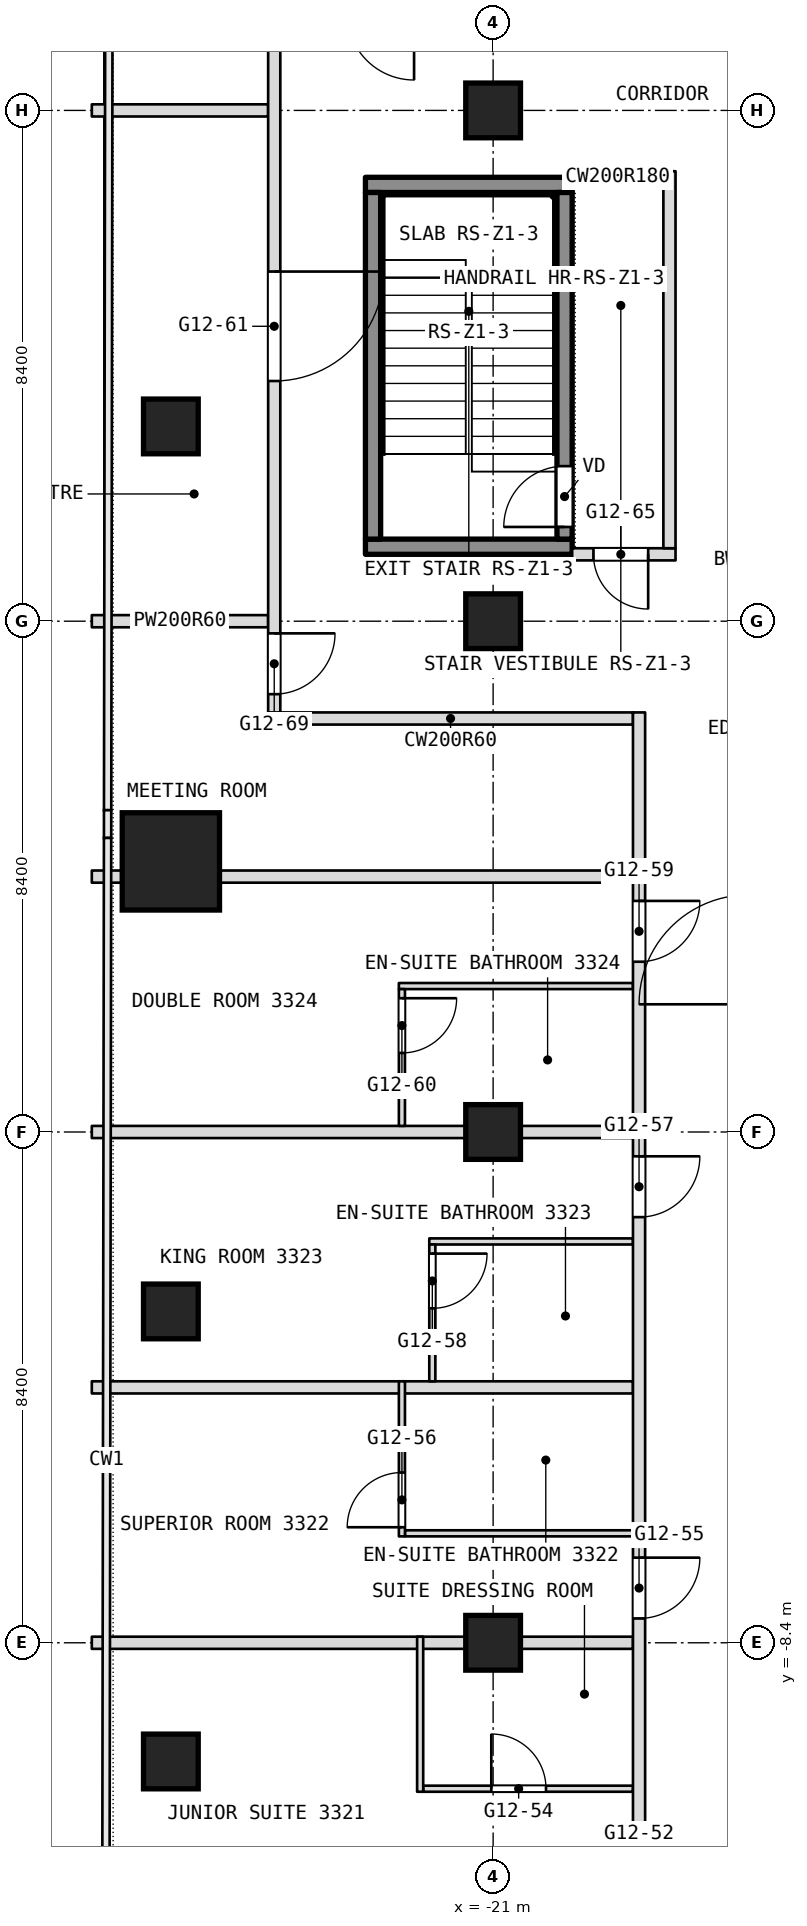
"""IFC4 building model, lengths in metres.
Left out: names, types, materials, properties, quantities, classifications, styles, units other than length and angle.
Written with IfcOpenShell. Run it as: python <this file> out.ifc"""

import sys

from ifc_helpers import new_model, si_unit, direction, frame, frame_2d, origin, origin_2d, place, context, subcontext, project, spatial, rectangle, extrude, element, fill, save


model = new_model("IFC4")
c1 = context("Model", 3, precision=1e-05, world=origin(), true_north=direction((0.0, 1.0)))
c2 = subcontext(c1, "Body", "Model", "MODEL_VIEW")
j1 = project(units=[si_unit("LENGTHUNIT", "METRE"), si_unit("PLANEANGLEUNIT", "RADIAN")], contexts=[c1])
p1 = place(None, origin())
s1 = spatial("IfcSite", under=j1, at=p1, CompositionType="ELEMENT")
p2 = place(p1, origin())
s2 = spatial("IfcBuilding", under=s1, at=p2, CompositionType="ELEMENT")
p3 = place(p2, frame((0.0, 0.0, 144.5)))
s3 = spatial("IfcBuildingStorey", under=s2, at=p3, CompositionType="ELEMENT", Elevation=144.5)
p4 = place(p3, frame((-26.3, 4.45, 0.0), z_axis=(0.0, 0.0, 1.0), x_axis=(1.0, 0.0, 0.0)))
e1 = element("IfcColumn", 1, at=p4, inside=s3, PredefinedType="COLUMN", context=c2, shape_type="SweptSolid", body=[
    extrude(rectangle(XDim=1.6, YDim=1.6, at=origin_2d()), origin(), (0.0, 0.0, 1.0), 3.6),
])
for number, where, z_axis, x_axis in (
    (2, (-21.0, -8.4, 0.0), (0.0, 0.0, 1.0), (1.0, 0.0, 0.0)),
    (3, (-21.0, 0.0, 0.0), (0.0, 0.0, 1.0), (1.0, 0.0, 0.0)),
    (4, (-21.0, 8.4, 0.0), (0.0, 0.0, 1.0), (1.0, 0.0, 0.0)),
    (5, (-21.0, 16.8, 0.0), (0.0, 0.0, 1.0), (1.0, 0.0, 0.0)),
    (6, (-26.3, -10.352, 0.0), (0.0, 0.0, 1.0), (1.0, 0.0, 0.0)),
    (7, (-26.3, -2.951, 0.0), (0.0, 0.0, 1.0), (1.0, 0.0, 0.0)),
    (8, (-26.3, 11.603, 0.0), (0.0, 0.0, 1.0), (1.0, 0.0, 0.0)),
):
    element("IfcColumn", number, at=place(p3, frame(where, z_axis=z_axis, x_axis=x_axis)), inside=s3, PredefinedType="COLUMN", context=c2, shape_type="SweptSolid", body=[
        extrude(rectangle(XDim=0.9, YDim=0.9, at=origin_2d()), origin(), (0.0, 0.0, 1.0), 3.6),
    ])
p5 = place(p3, frame((-22.15, -10.8, 0.0), z_axis=(0.0, 0.0, 1.0), x_axis=(1.0, 0.0, 0.0)))
e9 = element("IfcWall", 9, at=p5, inside=s3, PredefinedType="PARTITIONING", context=c2, shape_type="SweptSolid", body=[
    extrude(rectangle(XDim=3.45, YDim=0.1, at=frame_2d((1.725, 0.0))), origin(), (0.0, 0.0, 1.0), 3.34),
])
p6 = place(p5, frame((1.12, 0.0, 0.0)))
e10 = element("IfcOpeningElement", 10, at=p6, cuts=e9, PredefinedType="OPENING", context=c2, shape_type="SweptSolid", body=[
    extrude(rectangle(XDim=0.9, YDim=2.1, at=frame_2d((0.45, 1.05))), frame((0.0, 0.05, 0.0), z_axis=(0.0, -1.0, 0.0), x_axis=(1.0, 0.0, 0.0)), (0.0, 0.0, 1.0), 0.1),
])
p7 = place(p3, frame((-27.6, -8.4, 0.0), z_axis=(0.0, 0.0, 1.0), x_axis=(1.0, 0.0, 0.0)))
e11 = element("IfcWall", 11, at=p7, inside=s3, PredefinedType="PARTITIONING", context=c2, shape_type="SweptSolid", body=[
    extrude(rectangle(XDim=8.9, YDim=0.2, at=frame_2d((4.45, 0.0))), origin(), (0.0, 0.0, 1.0), 2.89),
])
p8 = place(p3, frame((-22.45, -6.6, 0.0), z_axis=(0.0, 0.0, 1.0), x_axis=(1.0, 0.0, 0.0)))
e12 = element("IfcWall", 12, at=p8, inside=s3, PredefinedType="PARTITIONING", context=c2, shape_type="SweptSolid", body=[
    extrude(rectangle(XDim=3.75, YDim=0.1, at=frame_2d((1.875, 0.0))), origin(), (0.0, 0.0, 1.0), 3.34),
])
p9 = place(p3, frame((-27.6, -4.2, 0.0), z_axis=(0.0, 0.0, 1.0), x_axis=(1.0, 0.0, 0.0)))
e13 = element("IfcWall", 13, at=p9, inside=s3, PredefinedType="PARTITIONING", context=c2, shape_type="SweptSolid", body=[
    extrude(rectangle(XDim=8.9, YDim=0.2, at=frame_2d((4.45, 0.0))), origin(), (0.0, 0.0, 1.0), 3.34),
])
p10 = place(p3, frame((-22.05, -1.8, 0.0), z_axis=(0.0, 0.0, 1.0), x_axis=(1.0, 0.0, 0.0)))
e14 = element("IfcWall", 14, at=p10, inside=s3, PredefinedType="PARTITIONING", context=c2, shape_type="SweptSolid", body=[
    extrude(rectangle(XDim=3.35, YDim=0.1, at=frame_2d((1.675, 0.0))), origin(), (0.0, 0.0, 1.0), 3.34),
])
p11 = place(p3, frame((-27.6, 0.0, 0.0), z_axis=(0.0, 0.0, 1.0), x_axis=(1.0, 0.0, 0.0)))
e15 = element("IfcWall", 15, at=p11, inside=s3, PredefinedType="PARTITIONING", context=c2, shape_type="SweptSolid", body=[
    extrude(rectangle(XDim=8.9, YDim=0.2, at=frame_2d((4.45, 0.0))), origin(), (0.0, 0.0, 1.0), 2.89),
])
p12 = place(p3, frame((-22.55, 2.4, 0.0), z_axis=(0.0, 0.0, 1.0), x_axis=(1.0, 0.0, 0.0)))
e16 = element("IfcWall", 16, at=p12, inside=s3, PredefinedType="PARTITIONING", context=c2, shape_type="SweptSolid", body=[
    extrude(rectangle(XDim=3.85, YDim=0.1, at=frame_2d((1.925, 0.0))), origin(), (0.0, 0.0, 1.0), 3.34),
])
p13 = place(p3, frame((-27.6, 4.2, 0.0), z_axis=(0.0, 0.0, 1.0), x_axis=(1.0, 0.0, 0.0)))
e17 = element("IfcWall", 17, at=p13, inside=s3, PredefinedType="PARTITIONING", context=c2, shape_type="SweptSolid", body=[
    extrude(rectangle(XDim=0.5, YDim=0.2, at=frame_2d((0.25, 0.0))), origin(), (0.0, 0.0, 1.0), 3.34),
])
p14 = place(p3, frame((-25.5, 4.2, 0.0), z_axis=(0.0, 0.0, 1.0), x_axis=(1.0, 0.0, 0.0)))
e18 = element("IfcWall", 18, at=p14, inside=s3, PredefinedType="PARTITIONING", context=c2, shape_type="SweptSolid", body=[
    extrude(rectangle(XDim=6.8, YDim=0.2, at=frame_2d((3.4, 0.0))), origin(), (0.0, 0.0, 1.0), 3.34),
])
p15 = place(p3, frame((-24.7, 6.8, 0.0), z_axis=(0.0, 0.0, 1.0), x_axis=(1.0, 0.0, 0.0)))
e19 = element("IfcWall", 19, at=p15, inside=s3, PredefinedType="PARTITIONING", context=c2, shape_type="SweptSolid", body=[
    extrude(rectangle(XDim=6.0, YDim=0.2, at=frame_2d((3.0, 0.0))), origin(), (0.0, 0.0, 1.0), 3.34),
])
p16 = place(p3, frame((-27.6, 8.4, 0.0), z_axis=(0.0, 0.0, 1.0), x_axis=(1.0, 0.0, 0.0)))
e20 = element("IfcWall", 20, at=p16, inside=s3, PredefinedType="PARTITIONING", context=c2, shape_type="SweptSolid", body=[
    extrude(rectangle(XDim=2.9, YDim=0.2, at=frame_2d((1.45, 0.0))), origin(), (0.0, 0.0, 1.0), 2.89),
])
p17 = place(p3, frame((-19.7, 9.5, 0.0), z_axis=(0.0, 0.0, 1.0), x_axis=(1.0, 0.0, 0.0)))
e21 = element("IfcWall", 21, at=p17, inside=s3, PredefinedType="PARTITIONING", context=c2, shape_type="SweptSolid", body=[
    extrude(rectangle(XDim=1.7, YDim=0.2, at=frame_2d((0.85, 0.0))), origin(), (0.0, 0.0, 1.0), 3.34),
])
p18 = place(p17, frame((0.35, 0.0, 0.0)))
e22 = element("IfcOpeningElement", 22, at=p18, cuts=e21, PredefinedType="OPENING", context=c2, shape_type="SweptSolid", body=[
    extrude(rectangle(XDim=0.9, YDim=2.1, at=frame_2d((0.45, 1.05))), frame((0.0, 0.1, 0.0), z_axis=(0.0, -1.0, 0.0), x_axis=(1.0, 0.0, 0.0)), (0.0, 0.0, 1.0), 0.2),
])
p19 = place(p3, frame((-19.7, 15.7, 0.0), z_axis=(0.0, 0.0, 1.0), x_axis=(1.0, 0.0, 0.0)))
e23 = element("IfcWall", 23, at=p19, inside=s3, PredefinedType="PARTITIONING", context=c2, shape_type="SweptSolid", body=[
    extrude(rectangle(XDim=1.5, YDim=0.2, at=frame_2d((0.75, 0.0))), origin(), (0.0, 0.0, 1.0), 3.34),
])
p20 = place(p3, frame((-27.6, 16.8, 0.0), z_axis=(0.0, 0.0, 1.0), x_axis=(1.0, 0.0, 0.0)))
e24 = element("IfcWall", 24, at=p20, inside=s3, PredefinedType="PARTITIONING", context=c2, shape_type="SweptSolid", body=[
    extrude(rectangle(XDim=2.9, YDim=0.2, at=frame_2d((1.45, 0.0))), origin(), (0.0, 0.0, 1.0), 2.89),
])
p21 = place(p3, frame((-18.1, 9.6, 0.0), z_axis=(0.0, 0.0, 1.0), x_axis=(0.0, 1.0, 0.0)))
e25 = element("IfcWall", 25, at=p21, inside=s3, PredefinedType="PARTITIONING", context=c2, shape_type="SweptSolid", body=[
    extrude(rectangle(XDim=6.2, YDim=0.2, at=frame_2d((3.1, 0.0))), origin(), (0.0, 0.0, 1.0), 3.34),
])
p22 = place(p3, frame((-18.6, -21.708, 0.0), z_axis=(0.0, 0.0, 1.0), x_axis=(0.0, 1.0, 0.0)))
e26 = element("IfcWall", 26, at=p22, inside=s3, PredefinedType="PARTITIONING", context=c2, shape_type="SweptSolid", body=[
    extrude(rectangle(XDim=28.608, YDim=0.2, at=frame_2d((14.304, 0.0))), origin(), (0.0, 0.0, 1.0), 3.34),
])
p23 = place(p22, frame((2.204, 0.0, 0.0)))
e27 = element("IfcOpeningElement", 27, at=p23, cuts=e26, PredefinedType="OPENING", context=c2, shape_type="SweptSolid", body=[
    extrude(rectangle(XDim=0.9, YDim=2.1, at=frame_2d((0.45, 1.05))), frame((0.0, 0.1, 0.0), z_axis=(0.0, -1.0, 0.0), x_axis=(1.0, 0.0, 0.0)), (0.0, 0.0, 1.0), 0.2),
])
p24 = place(p22, frame((8.608, 0.0, 0.0)))
e28 = element("IfcOpeningElement", 28, at=p24, cuts=e26, PredefinedType="OPENING", context=c2, shape_type="SweptSolid", body=[
    extrude(rectangle(XDim=1.1, YDim=2.1, at=frame_2d((0.55, 1.05))), frame((0.0, 0.1, 0.0), z_axis=(0.0, -1.0, 0.0), x_axis=(1.0, 0.0, 0.0)), (0.0, 0.0, 1.0), 0.2),
])
p25 = place(p22, frame((13.708, 0.0, 0.0)))
e29 = element("IfcOpeningElement", 29, at=p25, cuts=e26, PredefinedType="OPENING", context=c2, shape_type="SweptSolid", body=[
    extrude(rectangle(XDim=1.0, YDim=2.1, at=frame_2d((0.5, 1.05))), frame((0.0, 0.1, 0.0), z_axis=(0.0, -1.0, 0.0), x_axis=(1.0, 0.0, 0.0)), (0.0, 0.0, 1.0), 0.2),
])
p26 = place(p22, frame((20.308, 0.0, 0.0)))
e30 = element("IfcOpeningElement", 30, at=p26, cuts=e26, PredefinedType="OPENING", context=c2, shape_type="SweptSolid", body=[
    extrude(rectangle(XDim=1.0, YDim=2.1, at=frame_2d((0.5, 1.05))), frame((0.0, 0.1, 0.0), z_axis=(0.0, -1.0, 0.0), x_axis=(1.0, 0.0, 0.0)), (0.0, 0.0, 1.0), 0.2),
])
p27 = place(p22, frame((24.508, 0.0, 0.0)))
e31 = element("IfcOpeningElement", 31, at=p27, cuts=e26, PredefinedType="OPENING", context=c2, shape_type="SweptSolid", body=[
    extrude(rectangle(XDim=1.0, YDim=2.1, at=frame_2d((0.5, 1.05))), frame((0.0, 0.1, 0.0), z_axis=(0.0, -1.0, 0.0), x_axis=(1.0, 0.0, 0.0)), (0.0, 0.0, 1.0), 0.2),
])
p28 = place(p3, frame((-22.0, -4.1, 0.0), z_axis=(0.0, 0.0, 1.0), x_axis=(0.0, 1.0, 0.0)))
e32 = element("IfcWall", 32, at=p28, inside=s3, PredefinedType="PARTITIONING", context=c2, shape_type="SweptSolid", body=[
    extrude(rectangle(XDim=2.25, YDim=0.1, at=frame_2d((1.125, 0.0))), origin(), (0.0, 0.0, 1.0), 3.34),
])
p29 = place(p28, frame((1.2, 0.0, 0.0)))
e33 = element("IfcOpeningElement", 33, at=p29, cuts=e32, PredefinedType="OPENING", context=c2, shape_type="SweptSolid", body=[
    extrude(rectangle(XDim=0.9, YDim=2.1, at=frame_2d((0.45, 1.05))), frame((0.0, 0.05, 0.0), z_axis=(0.0, -1.0, 0.0), x_axis=(1.0, 0.0, 0.0)), (0.0, 0.0, 1.0), 0.1),
])
p30 = place(p3, frame((-22.2, -10.85, 0.0), z_axis=(0.0, 0.0, 1.0), x_axis=(0.0, 1.0, 0.0)))
e34 = element("IfcWall", 34, at=p30, inside=s3, PredefinedType="PARTITIONING", context=c2, shape_type="SweptSolid", body=[
    extrude(rectangle(XDim=2.55, YDim=0.1, at=frame_2d((1.275, 0.0))), origin(), (0.0, 0.0, 1.0), 3.34),
])
p31 = place(p3, frame((-22.5, -6.65, 0.0), z_axis=(0.0, 0.0, 1.0), x_axis=(0.0, 1.0, 0.0)))
e35 = element("IfcWall", 35, at=p31, inside=s3, PredefinedType="PARTITIONING", context=c2, shape_type="SweptSolid", body=[
    extrude(rectangle(XDim=2.55, YDim=0.1, at=frame_2d((1.275, 0.0))), origin(), (0.0, 0.0, 1.0), 3.34),
])
p32 = place(p31, frame((0.15, 0.0, 0.0)))
e36 = element("IfcOpeningElement", 36, at=p32, cuts=e35, PredefinedType="OPENING", context=c2, shape_type="SweptSolid", body=[
    extrude(rectangle(XDim=0.9, YDim=2.1, at=frame_2d((0.45, 1.05))), frame((0.0, 0.05, 0.0), z_axis=(0.0, -1.0, 0.0), x_axis=(1.0, 0.0, 0.0)), (0.0, 0.0, 1.0), 0.1),
])
p33 = place(p3, frame((-22.5, 0.1, 0.0), z_axis=(0.0, 0.0, 1.0), x_axis=(0.0, 1.0, 0.0)))
e37 = element("IfcWall", 37, at=p33, inside=s3, PredefinedType="PARTITIONING", context=c2, shape_type="SweptSolid", body=[
    extrude(rectangle(XDim=2.25, YDim=0.1, at=frame_2d((1.125, 0.0))), origin(), (0.0, 0.0, 1.0), 3.34),
])
p34 = place(p33, frame((1.2, 0.0, 0.0)))
e38 = element("IfcOpeningElement", 38, at=p34, cuts=e37, PredefinedType="OPENING", context=c2, shape_type="SweptSolid", body=[
    extrude(rectangle(XDim=0.9, YDim=2.1, at=frame_2d((0.45, 1.05))), frame((0.0, 0.05, 0.0), z_axis=(0.0, -1.0, 0.0), x_axis=(1.0, 0.0, 0.0)), (0.0, 0.0, 1.0), 0.1),
])
p35 = place(p3, frame((-24.6, 6.9, 0.0), z_axis=(0.0, 0.0, 1.0), x_axis=(0.0, 1.0, 0.0)))
e39 = element("IfcWall", 39, at=p35, inside=s3, PredefinedType="PARTITIONING", context=c2, shape_type="SweptSolid", body=[
    extrude(rectangle(XDim=11.6, YDim=0.2, at=frame_2d((5.8, 0.0))), origin(), (0.0, 0.0, 1.0), 3.34),
])
p36 = place(p35, frame((5.45, 0.0, 0.0)))
e40 = element("IfcOpeningElement", 40, at=p36, cuts=e39, PredefinedType="OPENING", context=c2, shape_type="SweptSolid", body=[
    extrude(rectangle(XDim=1.8, YDim=2.1, at=frame_2d((0.9, 1.05))), frame((0.0, 0.1, 0.0), z_axis=(0.0, -1.0, 0.0), x_axis=(1.0, 0.0, 0.0)), (0.0, 0.0, 1.0), 0.2),
])
p37 = place(p35, frame((0.3, 0.0, 0.0)))
e41 = element("IfcOpeningElement", 41, at=p37, cuts=e39, PredefinedType="OPENING", context=c2, shape_type="SweptSolid", body=[
    extrude(rectangle(XDim=1.0, YDim=2.1, at=frame_2d((0.5, 1.05))), frame((0.0, 0.1, 0.0), z_axis=(0.0, -1.0, 0.0), x_axis=(1.0, 0.0, 0.0)), (0.0, 0.0, 1.0), 0.2),
])
for number, where, z_axis, x_axis in (
    (42, (-23.1, 9.625, 0.1), (0.0, 0.0, 1.0), (1.0, 0.0, 0.0)),
    (43, (-23.1, 15.575, 0.1), (0.0, 0.0, 1.0), (1.0, 0.0, 0.0)),
):
    element("IfcWall", number, at=place(p3, frame(where, z_axis=z_axis, x_axis=x_axis)), inside=s3, PredefinedType="SHEAR", context=c2, shape_type="SweptSolid", body=[
        extrude(rectangle(XDim=3.4, YDim=0.25, at=frame_2d((1.7, 0.0))), origin(), (0.0, 0.0, 1.0), 3.6),
    ])
p38 = place(p3, frame((-22.975, 9.75, 0.1), z_axis=(0.0, 0.0, 1.0), x_axis=(0.0, 1.0, 0.0)))
e44 = element("IfcWall", 44, at=p38, inside=s3, PredefinedType="SHEAR", context=c2, shape_type="SweptSolid", body=[
    extrude(rectangle(XDim=5.7, YDim=0.25, at=frame_2d((2.85, 0.0))), origin(), (0.0, 0.0, 1.0), 3.6),
])
p39 = place(p3, frame((-19.825, 9.75, 0.1), z_axis=(0.0, 0.0, 1.0), x_axis=(0.0, 1.0, 0.0)))
e45 = element("IfcWall", 45, at=p39, inside=s3, PredefinedType="SHEAR", context=c2, shape_type="SweptSolid", body=[
    extrude(rectangle(XDim=5.7, YDim=0.25, at=frame_2d((2.85, 0.0))), origin(), (0.0, 0.0, 1.0), 3.6),
])
p40 = place(p39, frame((0.2, 0.0, 0.0)))
e46 = element("IfcOpeningElement", 46, at=p40, cuts=e45, PredefinedType="OPENING", context=c2, shape_type="SweptSolid", body=[
    extrude(rectangle(XDim=1.0, YDim=2.1, at=frame_2d((0.5, 1.05))), frame((0.0, 0.125, 0.0), z_axis=(0.0, -1.0, 0.0), x_axis=(1.0, 0.0, 0.0)), (0.0, 0.0, 1.0), 0.25),
])
p41 = place(p6, origin())
e47 = element("IfcDoor", 47, at=p41, inside=s3, OperationType="SINGLE_SWING_LEFT", PredefinedType="DOOR", context=c2, shape_type="SweptSolid", body=[
    extrude(rectangle(XDim=0.9, YDim=2.1, at=frame_2d((0.45, 1.05))), frame((0.0, 0.025, 0.0), z_axis=(0.0, -1.0, 0.0), x_axis=(1.0, 0.0, 0.0)), (0.0, 0.0, 1.0), 0.05),
])
fill(e10, e47)
p42 = place(p18, origin())
e48 = element("IfcDoor", 48, at=p42, inside=s3, OperationType="SINGLE_SWING_RIGHT", PredefinedType="DOOR", context=c2, shape_type="SweptSolid", body=[
    extrude(rectangle(XDim=0.9, YDim=2.1, at=frame_2d((0.45, 1.05))), frame((0.0, 0.025, 0.0), z_axis=(0.0, -1.0, 0.0), x_axis=(1.0, 0.0, 0.0)), (0.0, 0.0, 1.0), 0.05),
])
fill(e22, e48)
p43 = place(p25, origin())
e49 = element("IfcDoor", 49, at=p43, inside=s3, OperationType="SINGLE_SWING_RIGHT", PredefinedType="DOOR", context=c2, shape_type="SweptSolid", body=[
    extrude(rectangle(XDim=1.0, YDim=2.1, at=frame_2d((0.5, 1.05))), frame((0.0, 0.025, 0.0), z_axis=(0.0, -1.0, 0.0), x_axis=(1.0, 0.0, 0.0)), (0.0, 0.0, 1.0), 0.05),
])
fill(e29, e49)
p44 = place(p26, origin())
e50 = element("IfcDoor", 50, at=p44, inside=s3, OperationType="SINGLE_SWING_RIGHT", PredefinedType="DOOR", context=c2, shape_type="SweptSolid", body=[
    extrude(rectangle(XDim=1.0, YDim=2.1, at=frame_2d((0.5, 1.05))), frame((0.0, 0.025, 0.0), z_axis=(0.0, -1.0, 0.0), x_axis=(1.0, 0.0, 0.0)), (0.0, 0.0, 1.0), 0.05),
])
fill(e30, e50)
p45 = place(p27, origin())
e51 = element("IfcDoor", 51, at=p45, inside=s3, OperationType="SINGLE_SWING_RIGHT", PredefinedType="DOOR", context=c2, shape_type="SweptSolid", body=[
    extrude(rectangle(XDim=1.0, YDim=2.1, at=frame_2d((0.5, 1.05))), frame((0.0, 0.025, 0.0), z_axis=(0.0, -1.0, 0.0), x_axis=(1.0, 0.0, 0.0)), (0.0, 0.0, 1.0), 0.05),
])
fill(e31, e51)
p46 = place(p29, origin())
e52 = element("IfcDoor", 52, at=p46, inside=s3, OperationType="SINGLE_SWING_LEFT", PredefinedType="DOOR", context=c2, shape_type="SweptSolid", body=[
    extrude(rectangle(XDim=0.9, YDim=2.1, at=frame_2d((0.45, 1.05))), frame((0.0, 0.025, 0.0), z_axis=(0.0, -1.0, 0.0), x_axis=(1.0, 0.0, 0.0)), (0.0, 0.0, 1.0), 0.05),
])
fill(e33, e52)
p47 = place(p32, origin())
e53 = element("IfcDoor", 53, at=p47, inside=s3, OperationType="SINGLE_SWING_RIGHT", PredefinedType="DOOR", context=c2, shape_type="SweptSolid", body=[
    extrude(rectangle(XDim=0.9, YDim=2.1, at=frame_2d((0.45, 1.05))), frame((0.0, 0.025, 0.0), z_axis=(0.0, -1.0, 0.0), x_axis=(1.0, 0.0, 0.0)), (0.0, 0.0, 1.0), 0.05),
])
fill(e36, e53)
p48 = place(p34, origin())
e54 = element("IfcDoor", 54, at=p48, inside=s3, OperationType="SINGLE_SWING_LEFT", PredefinedType="DOOR", context=c2, shape_type="SweptSolid", body=[
    extrude(rectangle(XDim=0.9, YDim=2.1, at=frame_2d((0.45, 1.05))), frame((0.0, 0.025, 0.0), z_axis=(0.0, -1.0, 0.0), x_axis=(1.0, 0.0, 0.0)), (0.0, 0.0, 1.0), 0.05),
])
fill(e38, e54)
p49 = place(p36, origin())
e55 = element("IfcDoor", 55, at=p49, inside=s3, OperationType="DOUBLE_DOOR_SINGLE_SWING", PredefinedType="DOOR", context=c2, shape_type="SweptSolid", body=[
    extrude(rectangle(XDim=1.8, YDim=2.1, at=frame_2d((0.9, 1.05))), frame((0.0, 0.025, 0.0), z_axis=(0.0, -1.0, 0.0), x_axis=(1.0, 0.0, 0.0)), (0.0, 0.0, 1.0), 0.05),
])
fill(e40, e55)
p50 = place(p37, origin())
e56 = element("IfcDoor", 56, at=p50, inside=s3, OperationType="SINGLE_SWING_LEFT", PredefinedType="DOOR", context=c2, shape_type="SweptSolid", body=[
    extrude(rectangle(XDim=1.0, YDim=2.1, at=frame_2d((0.5, 1.05))), frame((0.0, 0.025, 0.0), z_axis=(0.0, -1.0, 0.0), x_axis=(1.0, 0.0, 0.0)), (0.0, 0.0, 1.0), 0.05),
])
fill(e41, e56)
p51 = place(p40, origin())
e57 = element("IfcDoor", 57, at=p51, inside=s3, OperationType="SINGLE_SWING_LEFT", PredefinedType="DOOR", context=c2, shape_type="SweptSolid", body=[
    extrude(rectangle(XDim=1.0, YDim=2.1, at=frame_2d((0.5, 1.05))), frame((0.0, 0.025, 0.0), z_axis=(0.0, -1.0, 0.0), x_axis=(1.0, 0.0, 0.0)), (0.0, 0.0, 1.0), 0.05),
])
fill(e46, e57)
save(model, sys.argv[1])
